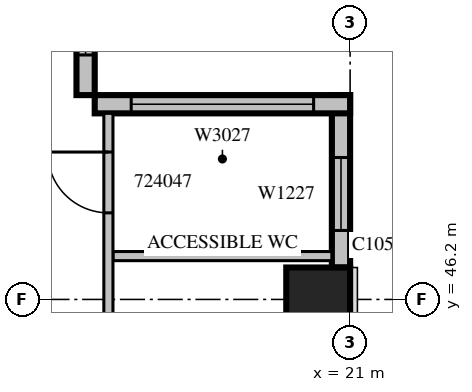
"""IFC4 building model, lengths in metres.
Left out: names, types, materials, properties, quantities, classifications, styles, units other than length and angle.
Written with IfcOpenShell. Run it as: python <this file> out.ifc"""

import sys

from ifc_helpers import new_model, si_unit, direction, frame, frame_2d, origin, origin_2d, place, context, subcontext, project, spatial, rectangle, extrude, source, transform, mapped, element, fill, save


model = new_model("IFC4")
c1 = context("Model", 3, precision=1e-05, world=origin(), true_north=direction((0.0, 1.0)))
c2 = subcontext(c1, "Body", "Model", "MODEL_VIEW")
j1 = project(units=[si_unit("LENGTHUNIT", "METRE"), si_unit("PLANEANGLEUNIT", "RADIAN")], contexts=[c1])
p1 = place(None, origin())
s1 = spatial("IfcSite", under=j1, at=p1, CompositionType="ELEMENT")
p2 = place(p1, origin())
s2 = spatial("IfcBuilding", under=s1, at=p2, CompositionType="ELEMENT")
p3 = place(p2, frame((0.0, 0.0, 111.9)))
s3 = spatial("IfcBuildingStorey", under=s2, at=p3, CompositionType="ELEMENT", Elevation=111.9)
m1 = source(origin(), c2, "Body", "SweptSolid", [
    extrude(rectangle(XDim=1.05, YDim=1.05, at=origin_2d()), origin(), (0.0, 0.0, 1.0), 4.2),
])
p4 = place(p3, frame((20.475, 46.2, 0.0), z_axis=(0.0, 0.0, 1.0), x_axis=(1.0, 0.0, 0.0)))
e1 = element("IfcColumn", 1, at=p4, inside=s3, PredefinedType="COLUMN", context=c2, shape_type="MappedRepresentation", body=[
    mapped(m1, transform((0.0, 0.0, 0.0), scale=1.0)),
])
m2 = source(origin(), c2, "Body", "SweptSolid", [
    extrude(rectangle(XDim=2.835, YDim=0.3, at=frame_2d((1.417, 0.0))), origin(), (0.0, 0.0, 1.0), 3.8),
])
p5 = place(p3, frame((20.85, 46.725, 0.0), z_axis=(0.0, 0.0, 1.0), x_axis=(0.0, 1.0, 0.0)))
e2 = element("IfcWall", 2, at=p5, inside=s3, PredefinedType="STANDARD", context=c2, shape_type="MappedRepresentation", body=[
    mapped(m2, transform((0.0, 0.0, 0.0), scale=1.0)),
])
m3 = source(origin(), c2, "Body", "SweptSolid", [
    extrude(rectangle(XDim=1.2, YDim=2.7, at=frame_2d((0.6, 1.35))), frame((0.0, 0.16, 0.0), z_axis=(0.0, -1.0, 0.0), x_axis=(1.0, 0.0, 0.0)), (0.0, 0.0, 1.0), 0.32),
])
p6 = place(p5, frame((0.609, 0.0, 0.6)))
e3 = element("IfcOpeningElement", 3, at=p6, cuts=e2, PredefinedType="OPENING", context=c2, shape_type="MappedRepresentation", body=[
    mapped(m3, transform((0.0, 0.0, 0.0), scale=1.0)),
])
m4 = source(origin(), c2, "Body", "SweptSolid", [
    extrude(rectangle(XDim=4.2, YDim=0.3, at=frame_2d((2.1, 0.0))), origin(), (0.0, 0.0, 1.0), 3.8),
])
p7 = place(p3, frame((21.0, 49.41, 0.0), z_axis=(0.0, 0.0, 1.0), x_axis=(-1.0, 0.0, 0.0)))
e4 = element("IfcWall", 4, at=p7, inside=s3, PredefinedType="STANDARD", context=c2, shape_type="MappedRepresentation", body=[
    mapped(m4, transform((0.0, 0.0, 0.0), scale=1.0)),
])
m5 = source(origin(), c2, "Body", "SweptSolid", [
    extrude(rectangle(XDim=3.0, YDim=2.7, at=frame_2d((1.5, 1.35))), frame((0.0, 0.16, 0.0), z_axis=(0.0, -1.0, 0.0), x_axis=(1.0, 0.0, 0.0)), (0.0, 0.0, 1.0), 0.32),
])
p8 = place(p7, frame((0.6, 0.0, 0.6)))
e5 = element("IfcOpeningElement", 5, at=p8, cuts=e4, PredefinedType="OPENING", context=c2, shape_type="MappedRepresentation", body=[
    mapped(m5, transform((0.0, 0.0, 0.0), scale=1.0)),
])
m6 = source(origin(), c2, "Body", "SweptSolid", [
    extrude(rectangle(XDim=2.52, YDim=0.3, at=frame_2d((1.26, 0.0))), origin(), (0.0, 0.0, 1.0), 3.8),
])
p9 = place(p3, frame((16.65, 49.56, 0.0), z_axis=(0.0, 0.0, 1.0), x_axis=(0.0, 1.0, 0.0)))
e6 = element("IfcWall", 6, at=p9, inside=s3, PredefinedType="STANDARD", context=c2, shape_type="MappedRepresentation", body=[
    mapped(m6, transform((0.0, 0.0, 0.0), scale=1.0)),
])
p10 = place(p9, frame((0.66, 0.0, 0.6)))
e7 = element("IfcOpeningElement", 7, at=p10, cuts=e6, PredefinedType="OPENING", context=c2, shape_type="MappedRepresentation", body=[
    mapped(m3, transform((0.0, 0.0, 0.0), scale=1.0)),
])
m7 = source(origin(), c2, "Body", "SweptSolid", [
    extrude(rectangle(XDim=3.6, YDim=0.15, at=frame_2d((1.8, 0.0))), origin(), (0.0, 0.0, 1.0), 3.8),
])
p11 = place(p3, frame((17.1, 46.913, 0.0), z_axis=(0.0, 0.0, 1.0), x_axis=(1.0, 0.0, 0.0)))
e8 = element("IfcWall", 8, at=p11, inside=s3, PredefinedType="PARTITIONING", context=c2, shape_type="MappedRepresentation", body=[
    mapped(m7, transform((0.0, 0.0, 0.0), scale=1.0)),
])
m8 = source(origin(), c2, "Body", "SweptSolid", [
    extrude(rectangle(XDim=19.86, YDim=0.15, at=frame_2d((9.93, 0.0))), origin(), (0.0, 0.0, 1.0), 3.8),
])
p12 = place(p3, frame((17.025, 49.26, 0.0), z_axis=(0.0, 0.0, 1.0), x_axis=(0.0, -1.0, 0.0)))
e9 = element("IfcWall", 9, at=p12, inside=s3, PredefinedType="PARTITIONING", context=c2, shape_type="MappedRepresentation", body=[
    mapped(m8, transform((0.0, 0.0, 0.0), scale=1.0)),
])
m9 = source(origin(), c2, "Body", "SweptSolid", [
    extrude(rectangle(XDim=1.0, YDim=2.1, at=frame_2d((0.5, 1.05))), frame((0.0, 0.085, 0.0), z_axis=(0.0, -1.0, 0.0), x_axis=(1.0, 0.0, 0.0)), (0.0, 0.0, 1.0), 0.17),
])
p13 = place(p12, frame((17.503, 0.0, 0.0)))
e10 = element("IfcOpeningElement", 10, at=p13, cuts=e9, PredefinedType="OPENING", context=c2, shape_type="MappedRepresentation", body=[
    mapped(m9, transform((0.0, 0.0, 0.0), scale=1.0)),
])
p14 = place(p12, frame((14.191, 0.0, 0.0)))
e11 = element("IfcOpeningElement", 11, at=p14, cuts=e9, PredefinedType="OPENING", context=c2, shape_type="MappedRepresentation", body=[
    mapped(m9, transform((0.0, 0.0, 0.0), scale=1.0)),
])
p15 = place(p12, frame((11.848, 0.0, 0.0)))
e12 = element("IfcOpeningElement", 12, at=p15, cuts=e9, PredefinedType="OPENING", context=c2, shape_type="MappedRepresentation", body=[
    mapped(m9, transform((0.0, 0.0, 0.0), scale=1.0)),
])
p16 = place(p12, frame((8.412, 0.0, 0.0)))
e13 = element("IfcOpeningElement", 13, at=p16, cuts=e9, PredefinedType="OPENING", context=c2, shape_type="MappedRepresentation", body=[
    mapped(m9, transform((0.0, 0.0, 0.0), scale=1.0)),
])
p17 = place(p12, frame((3.856, 0.0, 0.0)))
e14 = element("IfcOpeningElement", 14, at=p17, cuts=e9, PredefinedType="OPENING", context=c2, shape_type="MappedRepresentation", body=[
    mapped(m9, transform((0.0, 0.0, 0.0), scale=1.0)),
])
p18 = place(p12, frame((0.636, 0.0, 0.0)))
e15 = element("IfcOpeningElement", 15, at=p18, cuts=e9, PredefinedType="OPENING", context=c2, shape_type="MappedRepresentation", body=[
    mapped(m9, transform((0.0, 0.0, 0.0), scale=1.0)),
])
m10 = source(origin(), c2, "Body", "SweptSolid", [
    extrude(rectangle(XDim=1.2, YDim=2.7, at=frame_2d((0.6, 1.35))), frame((0.0, 0.03, 0.0), z_axis=(0.0, -1.0, 0.0), x_axis=(1.0, 0.0, 0.0)), (0.0, 0.0, 1.0), 0.06),
])
p19 = place(p6, origin())
e16 = element("IfcWindow", 16, at=p19, inside=s3, PartitioningType="SINGLE_PANEL", PredefinedType="WINDOW", context=c2, shape_type="MappedRepresentation", body=[
    mapped(m10, transform((0.0, 0.0, 0.0), scale=1.0)),
])
fill(e3, e16)
m11 = source(origin(), c2, "Body", "SweptSolid", [
    extrude(rectangle(XDim=3.0, YDim=2.7, at=frame_2d((1.5, 1.35))), frame((0.0, 0.03, 0.0), z_axis=(0.0, -1.0, 0.0), x_axis=(1.0, 0.0, 0.0)), (0.0, 0.0, 1.0), 0.06),
])
p20 = place(p8, origin())
e17 = element("IfcWindow", 17, at=p20, inside=s3, PartitioningType="SINGLE_PANEL", PredefinedType="WINDOW", context=c2, shape_type="MappedRepresentation", body=[
    mapped(m11, transform((0.0, 0.0, 0.0), scale=1.0)),
])
fill(e5, e17)
p21 = place(p10, origin())
e18 = element("IfcWindow", 18, at=p21, inside=s3, PartitioningType="SINGLE_PANEL", PredefinedType="WINDOW", context=c2, shape_type="MappedRepresentation", body=[
    mapped(m10, transform((0.0, 0.0, 0.0), scale=1.0)),
])
fill(e7, e18)
m12 = source(origin(), c2, "Body", "SweptSolid", [
    extrude(rectangle(XDim=1.0, YDim=2.1, at=frame_2d((0.5, 1.05))), frame((0.0, 0.025, 0.0), z_axis=(0.0, -1.0, 0.0), x_axis=(1.0, 0.0, 0.0)), (0.0, 0.0, 1.0), 0.05),
])
p22 = place(p18, origin())
e19 = element("IfcDoor", 19, at=p22, inside=s3, OperationType="SINGLE_SWING_RIGHT", PredefinedType="DOOR", context=c2, shape_type="MappedRepresentation", body=[
    mapped(m12, transform((0.0, 0.0, 0.0), scale=1.0)),
])
fill(e15, e19)
save(model, sys.argv[1])
